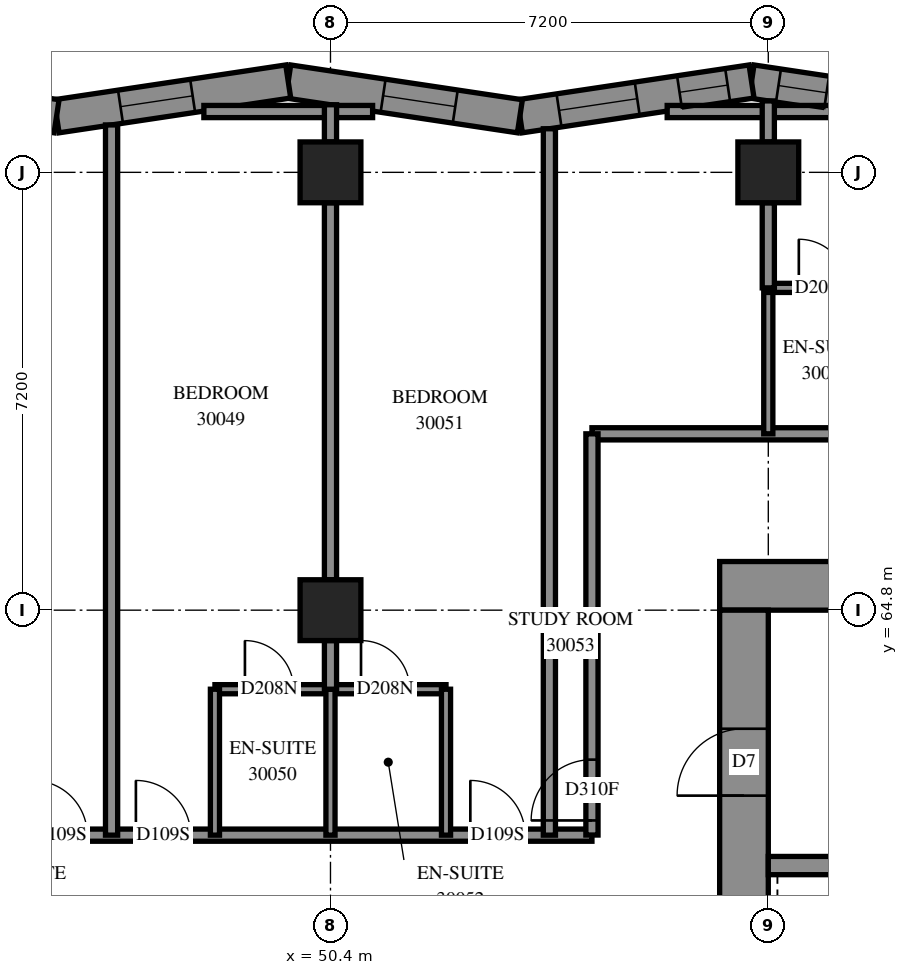
"""IFC4 building model, lengths in metres.
Left out: names, types, materials, properties, quantities, classifications, styles, units other than length and angle.
Written with IfcOpenShell. Run it as: python <this file> out.ifc"""

import sys

from ifc_helpers import new_model, si_unit, direction, frame, frame_2d, origin, origin_2d, place, context, subcontext, project, spatial, polyline, rectangle, outline, extrude, element, fill, save


model = new_model("IFC4")
c1 = context("Model", 3, precision=1e-05, world=origin(), true_north=direction((0.0, 1.0)))
c2 = subcontext(c1, "Body", "Model", "MODEL_VIEW")
j1 = project(units=[si_unit("LENGTHUNIT", "METRE"), si_unit("PLANEANGLEUNIT", "RADIAN")], contexts=[c1])
p1 = place(None, origin())
s1 = spatial("IfcSite", under=j1, at=p1, CompositionType="ELEMENT")
p2 = place(p1, origin())
s2 = spatial("IfcBuilding", under=s1, at=p2, CompositionType="ELEMENT")
p3 = place(p2, frame((0.0, 0.0, 111.8)))
s3 = spatial("IfcBuildingStorey", under=s2, at=p3, CompositionType="ELEMENT", Elevation=111.8)
for number, where, z_axis, x_axis in (
    (1, (50.4, 64.8, 0.0), (0.0, 0.0, 1.0), (1.0, 0.0, 0.0)),
    (2, (50.4, 72.0, 0.0), (0.0, 0.0, 1.0), (1.0, 0.0, 0.0)),
    (3, (57.6, 72.0, 0.0), (0.0, 0.0, 1.0), (1.0, 0.0, 0.0)),
):
    element("IfcColumn", number, at=place(p3, frame(where, z_axis=z_axis, x_axis=x_axis)), inside=s3, PredefinedType="COLUMN", context=c2, shape_type="SweptSolid", body=[
        extrude(rectangle(XDim=1.0, YDim=1.0, at=origin_2d()), origin(), (0.0, 0.0, 1.0), 3.1),
    ])
p4 = place(p3, frame((56.8, 65.2, -0.3), z_axis=(0.0, 0.0, 1.0), x_axis=(1.0, 0.0, 0.0)))
e4 = element("IfcWall", 4, at=p4, inside=s3, PredefinedType="SHEAR", context=c2, shape_type="SweptSolid", body=[
    extrude(rectangle(XDim=16.0, YDim=0.8, at=frame_2d((8.0, 0.0))), origin(), (0.0, 0.0, 1.0), 2.7),
])
p5 = place(p4, frame((10.8, 0.0, 0.3)))
e5 = element("IfcOpeningElement", 5, at=p5, cuts=e4, PredefinedType="OPENING", context=c2, shape_type="SweptSolid", body=[
    extrude(rectangle(XDim=0.8, YDim=2.1, at=frame_2d((0.4, 1.05))), frame((0.0, 0.41, 0.0), z_axis=(0.0, -1.0, 0.0), x_axis=(1.0, 0.0, 0.0)), (0.0, 0.0, 1.0), 0.82),
])
p6 = place(p3, frame((57.2, 50.4, -0.3), z_axis=(0.0, 0.0, 1.0), x_axis=(0.0, 1.0, 0.0)))
e6 = element("IfcWall", 6, at=p6, inside=s3, PredefinedType="SHEAR", context=c2, shape_type="SweptSolid", body=[
    extrude(rectangle(XDim=14.4, YDim=0.8, at=frame_2d((7.2, 0.0))), origin(), (0.0, 0.0, 1.0), 2.7),
])
p7 = place(p6, frame((4.55, 0.0, 0.3)))
e7 = element("IfcOpeningElement", 7, at=p7, cuts=e6, PredefinedType="OPENING", context=c2, shape_type="SweptSolid", body=[
    extrude(rectangle(XDim=1.1, YDim=2.1, at=frame_2d((0.55, 1.05))), frame((0.0, 0.41, 0.0), z_axis=(0.0, -1.0, 0.0), x_axis=(1.0, 0.0, 0.0)), (0.0, 0.0, 1.0), 0.82),
])
p8 = place(p6, frame((11.35, 0.0, 0.3)))
e8 = element("IfcOpeningElement", 8, at=p8, cuts=e6, PredefinedType="OPENING", context=c2, shape_type="SweptSolid", body=[
    extrude(rectangle(XDim=1.1, YDim=2.1, at=frame_2d((0.55, 1.05))), frame((0.0, 0.41, 0.0), z_axis=(0.0, -1.0, 0.0), x_axis=(1.0, 0.0, 0.0)), (0.0, 0.0, 1.0), 0.82),
])
p9 = place(p3, frame((57.6, 60.6, 0.0), z_axis=(0.0, 0.0, 1.0), x_axis=(1.0, 0.0, 0.0)))
e9 = element("IfcWall", 9, at=p9, inside=s3, PredefinedType="SOLIDWALL", context=c2, shape_type="SweptSolid", body=[
    extrude(rectangle(XDim=7.2, YDim=0.3, at=frame_2d((3.6, 0.0))), origin(), (0.0, 0.0, 1.0), 3.1),
])
p10 = place(p3, frame((61.134, 72.922, 0.0), z_axis=(0.0, 0.0, 1.0), x_axis=(-0.9889155896, 0.1484788086, 0.0)))
e10 = element("IfcWall", 10, at=p10, inside=s3, PredefinedType="SOLIDWALL", context=c2, shape_type="SweptSolid", body=[
    extrude(outline(polyline([(0.041, -0.275), (3.894, -0.275), (3.811, 0.275), (-0.041, 0.275), (0.041, -0.275)])), origin(), (0.0, 0.0, 1.0), 3.1),
])
p11 = place(p10, frame((0.505, 0.0, 0.5)))
e11 = element("IfcOpeningElement", 11, at=p11, cuts=e10, PredefinedType="OPENING", context=c2, shape_type="SweptSolid", body=[
    extrude(rectangle(XDim=1.3, YDim=2.45, at=frame_2d((0.65, 1.225))), frame((0.0, 0.285, 0.0), z_axis=(0.0, -1.0, 0.0), x_axis=(1.0, 0.0, 0.0)), (0.0, 0.0, 1.0), 0.57),
])
p12 = place(p10, frame((2.605, 0.0, 0.45)))
e12 = element("IfcOpeningElement", 12, at=p12, cuts=e10, PredefinedType="OPENING", context=c2, shape_type="SweptSolid", body=[
    extrude(rectangle(XDim=0.8, YDim=2.5, at=frame_2d((0.4, 1.25))), frame((0.0, 0.285, 0.0), z_axis=(0.0, -1.0, 0.0), x_axis=(1.0, 0.0, 0.0)), (0.0, 0.0, 1.0), 0.57),
])
p13 = place(p3, frame((57.325, 73.494, 0.0), z_axis=(0.0, 0.0, 1.0), x_axis=(-0.9889155896, -0.1484788086, 0.0)))
e13 = element("IfcWall", 13, at=p13, inside=s3, PredefinedType="SOLIDWALL", context=c2, shape_type="SweptSolid", body=[
    extrude(outline(polyline([(-0.041, -0.275), (3.811, -0.275), (3.894, 0.275), (0.041, 0.275), (-0.041, -0.275)])), origin(), (0.0, 0.0, 1.0), 3.1),
])
p14 = place(p13, frame((1.902, 0.0, 0.5)))
e14 = element("IfcOpeningElement", 14, at=p14, cuts=e13, PredefinedType="OPENING", context=c2, shape_type="SweptSolid", body=[
    extrude(rectangle(XDim=1.3, YDim=2.45, at=frame_2d((0.65, 1.225))), frame((0.0, 0.285, 0.0), z_axis=(0.0, -1.0, 0.0), x_axis=(1.0, 0.0, 0.0)), (0.0, 0.0, 1.0), 0.57),
])
p15 = place(p13, frame((0.398, 0.0, 0.45)))
e15 = element("IfcOpeningElement", 15, at=p15, cuts=e13, PredefinedType="OPENING", context=c2, shape_type="SweptSolid", body=[
    extrude(rectangle(XDim=0.8, YDim=2.5, at=frame_2d((0.4, 1.25))), frame((0.0, 0.285, 0.0), z_axis=(0.0, -1.0, 0.0), x_axis=(1.0, 0.0, 0.0)), (0.0, 0.0, 1.0), 0.57),
])
p16 = place(p3, frame((53.515, 72.922, 0.0), z_axis=(0.0, 0.0, 1.0), x_axis=(-0.9889150173, 0.1484826202, 0.0)))
e16 = element("IfcWall", 16, at=p16, inside=s3, PredefinedType="SOLIDWALL", context=c2, shape_type="SweptSolid", body=[
    extrude(outline(polyline([(0.041, -0.275), (3.894, -0.275), (3.811, 0.275), (-0.041, 0.275), (0.041, -0.275)])), origin(), (0.0, 0.0, 1.0), 3.1),
])
p17 = place(p16, frame((1.075, 0.0, 0.5)))
e17 = element("IfcOpeningElement", 17, at=p17, cuts=e16, PredefinedType="OPENING", context=c2, shape_type="SweptSolid", body=[
    extrude(rectangle(XDim=1.2, YDim=2.45, at=frame_2d((0.6, 1.225))), frame((0.0, 0.285, 0.0), z_axis=(0.0, -1.0, 0.0), x_axis=(1.0, 0.0, 0.0)), (0.0, 0.0, 1.0), 0.57),
])
p18 = place(p3, frame((49.705, 73.494, 0.0), z_axis=(0.0, 0.0, 1.0), x_axis=(-0.9889155896, -0.1484788086, 0.0)))
e18 = element("IfcWall", 18, at=p18, inside=s3, PredefinedType="SOLIDWALL", context=c2, shape_type="SweptSolid", body=[
    extrude(outline(polyline([(-0.041, -0.275), (3.811, -0.275), (3.894, 0.275), (0.041, 0.275), (-0.041, -0.275)])), origin(), (0.0, 0.0, 1.0), 3.1),
])
p19 = place(p18, frame((1.59, 0.0, 0.5)))
e19 = element("IfcOpeningElement", 19, at=p19, cuts=e18, PredefinedType="OPENING", context=c2, shape_type="SweptSolid", body=[
    extrude(rectangle(XDim=1.2, YDim=2.45, at=frame_2d((0.6, 1.225))), frame((0.0, 0.285, 0.0), z_axis=(0.0, -1.0, 0.0), x_axis=(1.0, 0.0, 0.0)), (0.0, 0.0, 1.0), 0.57),
])
p20 = place(p3, frame((45.896, 72.922, 0.0), z_axis=(0.0, 0.0, 1.0), x_axis=(-0.9889150173, 0.1484826202, 0.0)))
e20 = element("IfcWall", 20, at=p20, inside=s3, PredefinedType="SOLIDWALL", context=c2, shape_type="SweptSolid", body=[
    extrude(outline(polyline([(0.041, -0.275), (3.894, -0.275), (3.811, 0.275), (-0.041, 0.275), (0.041, -0.275)])), origin(), (0.0, 0.0, 1.0), 3.1),
])
p21 = place(p20, frame((0.863, 0.0, 0.5)))
e21 = element("IfcOpeningElement", 21, at=p21, cuts=e20, PredefinedType="OPENING", context=c2, shape_type="SweptSolid", body=[
    extrude(rectangle(XDim=1.2, YDim=2.45, at=frame_2d((0.6, 1.225))), frame((0.0, 0.285, 0.0), z_axis=(0.0, -1.0, 0.0), x_axis=(1.0, 0.0, 0.0)), (0.0, 0.0, 1.0), 0.57),
])
p22 = place(p3, frame((33.502, 61.1, 0.0), z_axis=(0.0, 0.0, 1.0), x_axis=(1.0, 0.0, 0.0)))
e22 = element("IfcWall", 22, at=p22, inside=s3, PredefinedType="PARTITIONING", context=c2, shape_type="SweptSolid", body=[
    extrude(rectangle(XDim=21.198, YDim=0.2, at=frame_2d((10.599, 0.0))), origin(), (0.0, 0.0, 1.0), 3.1),
])
p23 = place(p22, frame((4.798, 0.0, 0.0)))
e23 = element("IfcOpeningElement", 23, at=p23, cuts=e22, PredefinedType="OPENING", context=c2, shape_type="SweptSolid", body=[
    extrude(rectangle(XDim=0.9, YDim=2.1, at=frame_2d((0.45, 1.05))), frame((0.0, 0.11, 0.0), z_axis=(0.0, -1.0, 0.0), x_axis=(1.0, 0.0, 0.0)), (0.0, 0.0, 1.0), 0.22),
])
p24 = place(p22, frame((6.498, 0.0, 0.0)))
e24 = element("IfcOpeningElement", 24, at=p24, cuts=e22, PredefinedType="OPENING", context=c2, shape_type="SweptSolid", body=[
    extrude(rectangle(XDim=0.9, YDim=2.1, at=frame_2d((0.45, 1.05))), frame((0.0, 0.11, 0.0), z_axis=(0.0, -1.0, 0.0), x_axis=(1.0, 0.0, 0.0)), (0.0, 0.0, 1.0), 0.22),
])
p25 = place(p22, frame((11.998, 0.0, 0.0)))
e25 = element("IfcOpeningElement", 25, at=p25, cuts=e22, PredefinedType="OPENING", context=c2, shape_type="SweptSolid", body=[
    extrude(rectangle(XDim=0.9, YDim=2.1, at=frame_2d((0.45, 1.05))), frame((0.0, 0.11, 0.0), z_axis=(0.0, -1.0, 0.0), x_axis=(1.0, 0.0, 0.0)), (0.0, 0.0, 1.0), 0.22),
])
p26 = place(p22, frame((13.698, 0.0, 0.0)))
e26 = element("IfcOpeningElement", 26, at=p26, cuts=e22, PredefinedType="OPENING", context=c2, shape_type="SweptSolid", body=[
    extrude(rectangle(XDim=0.9, YDim=2.1, at=frame_2d((0.45, 1.05))), frame((0.0, 0.11, 0.0), z_axis=(0.0, -1.0, 0.0), x_axis=(1.0, 0.0, 0.0)), (0.0, 0.0, 1.0), 0.22),
])
p27 = place(p22, frame((19.198, 0.0, 0.0)))
e27 = element("IfcOpeningElement", 27, at=p27, cuts=e22, PredefinedType="OPENING", context=c2, shape_type="SweptSolid", body=[
    extrude(rectangle(XDim=0.9, YDim=2.1, at=frame_2d((0.45, 1.05))), frame((0.0, 0.11, 0.0), z_axis=(0.0, -1.0, 0.0), x_axis=(1.0, 0.0, 0.0)), (0.0, 0.0, 1.0), 0.22),
])
p28 = place(p3, frame((54.7, 67.7, 0.0), z_axis=(0.0, 0.0, 1.0), x_axis=(1.0, 0.0, 0.0)))
e28 = element("IfcWall", 28, at=p28, inside=s3, PredefinedType="PARTITIONING", context=c2, shape_type="SweptSolid", body=[
    extrude(rectangle(XDim=20.2, YDim=0.2, at=frame_2d((10.1, 0.0))), origin(), (0.0, 0.0, 1.0), 3.1),
])
p29 = place(p28, frame((5.2, 0.0, 0.0)))
e29 = element("IfcOpeningElement", 29, at=p29, cuts=e28, PredefinedType="OPENING", context=c2, shape_type="SweptSolid", body=[
    extrude(rectangle(XDim=0.9, YDim=2.1, at=frame_2d((0.45, 1.05))), frame((0.0, 0.11, 0.0), z_axis=(0.0, -1.0, 0.0), x_axis=(1.0, 0.0, 0.0)), (0.0, 0.0, 1.0), 0.22),
])
p30 = place(p28, frame((8.838, 0.0, 0.0)))
e30 = element("IfcOpeningElement", 30, at=p30, cuts=e28, PredefinedType="OPENING", context=c2, shape_type="SweptSolid", body=[
    extrude(rectangle(XDim=1.0, YDim=2.1, at=frame_2d((0.5, 1.05))), frame((0.0, 0.11, 0.0), z_axis=(0.0, -1.0, 0.0), x_axis=(1.0, 0.0, 0.0)), (0.0, 0.0, 1.0), 0.22),
])
p31 = place(p28, frame((14.1, 0.0, 0.0)))
e31 = element("IfcOpeningElement", 31, at=p31, cuts=e28, PredefinedType="OPENING", context=c2, shape_type="SweptSolid", body=[
    extrude(rectangle(XDim=0.9, YDim=2.1, at=frame_2d((0.45, 1.05))), frame((0.0, 0.11, 0.0), z_axis=(0.0, -1.0, 0.0), x_axis=(1.0, 0.0, 0.0)), (0.0, 0.0, 1.0), 0.22),
])
p32 = place(p3, frame((46.8, 61.1, 0.0), z_axis=(0.0, 0.0, 1.0), x_axis=(0.0, 1.0, 0.0)))
e32 = element("IfcWall", 32, at=p32, inside=s3, PredefinedType="PARTITIONING", context=c2, shape_type="SweptSolid", body=[
    extrude(rectangle(XDim=11.68, YDim=0.2, at=frame_2d((5.84, 0.0))), origin(), (0.0, 0.0, 1.0), 3.1),
])
p33 = place(p3, frame((54.0, 61.1, 0.0), z_axis=(0.0, 0.0, 1.0), x_axis=(0.0, 1.0, 0.0)))
e33 = element("IfcWall", 33, at=p33, inside=s3, PredefinedType="PARTITIONING", context=c2, shape_type="SweptSolid", body=[
    extrude(rectangle(XDim=11.617, YDim=0.2, at=frame_2d((5.808, 0.0))), origin(), (0.0, 0.0, 1.0), 3.1),
])
p34 = place(p3, frame((54.7, 61.102, 0.0), z_axis=(0.0, 0.0, 1.0), x_axis=(0.0, 1.0, 0.0)))
e34 = element("IfcWall", 34, at=p34, inside=s3, PredefinedType="PARTITIONING", context=c2, shape_type="SweptSolid", body=[
    extrude(rectangle(XDim=6.598, YDim=0.2, at=frame_2d((3.299, 0.0))), origin(), (0.0, 0.0, 1.0), 3.1),
])
p35 = place(p34, frame((0.24, 0.0, 0.0)))
e35 = element("IfcOpeningElement", 35, at=p35, cuts=e34, PredefinedType="OPENING", context=c2, shape_type="SweptSolid", body=[
    extrude(rectangle(XDim=1.0, YDim=2.1, at=frame_2d((0.5, 1.05))), frame((0.0, 0.11, 0.0), z_axis=(0.0, -1.0, 0.0), x_axis=(1.0, 0.0, 0.0)), (0.0, 0.0, 1.0), 0.22),
])
p36 = place(p3, frame((50.4, 65.3, 0.0), z_axis=(0.0, 0.0, 1.0), x_axis=(0.0, 1.0, 0.0)))
e36 = element("IfcWall", 36, at=p36, inside=s3, PredefinedType="PARTITIONING", context=c2, shape_type="SweptSolid", body=[
    extrude(rectangle(XDim=6.2, YDim=0.2, at=frame_2d((3.1, 0.0))), origin(), (0.0, 0.0, 1.0), 3.1),
])
p37 = place(p3, frame((48.5, 63.5, 0.0), z_axis=(0.0, 0.0, 1.0), x_axis=(1.0, 0.0, 0.0)))
e37 = element("IfcWall", 37, at=p37, inside=s3, PredefinedType="PARTITIONING", context=c2, shape_type="SweptSolid", body=[
    extrude(rectangle(XDim=3.8, YDim=0.15, at=frame_2d((1.9, 0.0))), origin(), (0.0, 0.0, 1.0), 3.1),
])
p38 = place(p37, frame((0.493, 0.0, 0.0)))
e38 = element("IfcOpeningElement", 38, at=p38, cuts=e37, PredefinedType="OPENING", context=c2, shape_type="SweptSolid", body=[
    extrude(rectangle(XDim=0.8, YDim=2.1, at=frame_2d((0.4, 1.05))), frame((0.0, 0.085, 0.0), z_axis=(0.0, -1.0, 0.0), x_axis=(1.0, 0.0, 0.0)), (0.0, 0.0, 1.0), 0.17),
])
p39 = place(p37, frame((2.402, 0.0, 0.0)))
e39 = element("IfcOpeningElement", 39, at=p39, cuts=e37, PredefinedType="OPENING", context=c2, shape_type="SweptSolid", body=[
    extrude(rectangle(XDim=0.8, YDim=2.1, at=frame_2d((0.4, 1.05))), frame((0.0, 0.085, 0.0), z_axis=(0.0, -1.0, 0.0), x_axis=(1.0, 0.0, 0.0)), (0.0, 0.0, 1.0), 0.17),
])
for number, where, z_axis, x_axis in (
    (40, (55.937, 73.0, 0.0), (0.0, 0.0, 1.0), (1.0, 0.0, 0.0)),
    (41, (48.318, 73.0, 0.0), (0.0, 0.0, 1.0), (1.0, 0.0, 0.0)),
):
    element("IfcWall", number, at=place(p3, frame(where, z_axis=z_axis, x_axis=x_axis)), inside=s3, PredefinedType="PARTITIONING", context=c2, shape_type="SweptSolid", body=[
        extrude(rectangle(XDim=2.775, YDim=0.2, at=frame_2d((1.387, 0.0))), origin(), (0.0, 0.0, 1.0), 3.1),
    ])
for number, where, z_axis, x_axis in (
    (42, (48.5, 61.1, 0.0), (0.0, 0.0, 1.0), (0.0, 1.0, 0.0)),
    (43, (50.4, 61.1, 0.0), (0.0, 0.0, 1.0), (0.0, 1.0, 0.0)),
    (44, (52.3, 61.1, 0.0), (0.0, 0.0, 1.0), (0.0, 1.0, 0.0)),
    (45, (57.6, 67.7, 0.0), (0.0, 0.0, 1.0), (0.0, 1.0, 0.0)),
):
    element("IfcWall", number, at=place(p3, frame(where, z_axis=z_axis, x_axis=x_axis)), inside=s3, PredefinedType="PARTITIONING", context=c2, shape_type="SweptSolid", body=[
        extrude(rectangle(XDim=2.4, YDim=0.15, at=frame_2d((1.2, 0.0))), origin(), (0.0, 0.0, 1.0), 3.1),
    ])
p40 = place(p3, frame((57.6, 70.1, 0.0), z_axis=(0.0, 0.0, 1.0), x_axis=(1.0, 0.0, 0.0)))
e46 = element("IfcWall", 46, at=p40, inside=s3, PredefinedType="PARTITIONING", context=c2, shape_type="SweptSolid", body=[
    extrude(rectangle(XDim=1.9, YDim=0.15, at=frame_2d((0.95, 0.0))), origin(), (0.0, 0.0, 1.0), 3.1),
])
p41 = place(p40, frame((0.502, 0.0, 0.0)))
e47 = element("IfcOpeningElement", 47, at=p41, cuts=e46, PredefinedType="OPENING", context=c2, shape_type="SweptSolid", body=[
    extrude(rectangle(XDim=0.8, YDim=2.1, at=frame_2d((0.4, 1.05))), frame((0.0, 0.085, 0.0), z_axis=(0.0, -1.0, 0.0), x_axis=(1.0, 0.0, 0.0)), (0.0, 0.0, 1.0), 0.17),
])
p42 = place(p3, frame((57.6, 70.1, 0.0), z_axis=(0.0, 0.0, 1.0), x_axis=(0.0, 1.0, 0.0)))
e48 = element("IfcWall", 48, at=p42, inside=s3, PredefinedType="PARTITIONING", context=c2, shape_type="SweptSolid", body=[
    extrude(rectangle(XDim=1.4, YDim=0.2, at=frame_2d((0.7, 0.0))), origin(), (0.0, 0.0, 1.0), 3.1),
])
p43 = place(p3, frame((50.4, 63.5, 0.0), z_axis=(0.0, 0.0, 1.0), x_axis=(0.0, 1.0, 0.0)))
e49 = element("IfcWall", 49, at=p43, inside=s3, PredefinedType="PARTITIONING", context=c2, shape_type="SweptSolid", body=[
    extrude(rectangle(XDim=0.8, YDim=0.2, at=frame_2d((0.4, 0.0))), origin(), (0.0, 0.0, 1.0), 3.1),
])
p44 = place(p3, frame((50.4, 72.5, 0.0), z_axis=(0.0, 0.0, 1.0), x_axis=(0.0, 1.0, 0.0)))
e50 = element("IfcWall", 50, at=p44, inside=s3, PredefinedType="PARTITIONING", context=c2, shape_type="SweptSolid", body=[
    extrude(rectangle(XDim=0.612, YDim=0.2, at=frame_2d((0.306, 0.0))), origin(), (0.0, 0.0, 1.0), 3.1),
])
p45 = place(p3, frame((57.6, 72.5, 0.0), z_axis=(0.0, 0.0, 1.0), x_axis=(0.0, 1.0, 0.0)))
e51 = element("IfcWall", 51, at=p45, inside=s3, PredefinedType="PARTITIONING", context=c2, shape_type="SweptSolid", body=[
    extrude(rectangle(XDim=0.674, YDim=0.2, at=frame_2d((0.337, 0.0))), origin(), (0.0, 0.0, 1.0), 3.1),
])
p46 = place(p14, origin())
e52 = element("IfcWindow", 52, at=p46, inside=s3, PartitioningType="SINGLE_PANEL", PredefinedType="WINDOW", context=c2, shape_type="SweptSolid", body=[
    extrude(rectangle(XDim=1.3, YDim=2.45, at=frame_2d((0.65, 1.225))), frame((0.0, 0.155, 0.0), z_axis=(0.0, -1.0, 0.0), x_axis=(1.0, 0.0, 0.0)), (0.0, 0.0, 1.0), 0.06),
])
fill(e14, e52)
p47 = place(p17, origin())
e53 = element("IfcWindow", 53, at=p47, inside=s3, PartitioningType="SINGLE_PANEL", PredefinedType="WINDOW", context=c2, shape_type="SweptSolid", body=[
    extrude(rectangle(XDim=1.2, YDim=2.45, at=frame_2d((0.6, 1.225))), frame((0.0, 0.155, 0.0), z_axis=(0.0, -1.0, 0.0), x_axis=(1.0, 0.0, 0.0)), (0.0, 0.0, 1.0), 0.06),
])
fill(e17, e53)
p48 = place(p19, origin())
e54 = element("IfcWindow", 54, at=p48, inside=s3, PartitioningType="SINGLE_PANEL", PredefinedType="WINDOW", context=c2, shape_type="SweptSolid", body=[
    extrude(rectangle(XDim=1.2, YDim=2.45, at=frame_2d((0.6, 1.225))), frame((0.0, 0.155, 0.0), z_axis=(0.0, -1.0, 0.0), x_axis=(1.0, 0.0, 0.0)), (0.0, 0.0, 1.0), 0.06),
])
fill(e19, e54)
p49 = place(p8, origin())
e55 = element("IfcDoor", 55, at=p49, inside=s3, OperationType="SINGLE_SWING_LEFT", PredefinedType="DOOR", context=c2, shape_type="SweptSolid", body=[
    extrude(rectangle(XDim=1.1, YDim=2.1, at=frame_2d((0.55, 1.05))), frame((0.0, 0.025, 0.0), z_axis=(0.0, -1.0, 0.0), x_axis=(1.0, 0.0, 0.0)), (0.0, 0.0, 1.0), 0.05),
])
fill(e8, e55)
p50 = place(p25, origin())
e56 = element("IfcDoor", 56, at=p50, inside=s3, OperationType="SINGLE_SWING_RIGHT", PredefinedType="DOOR", context=c2, shape_type="SweptSolid", body=[
    extrude(rectangle(XDim=0.9, YDim=2.1, at=frame_2d((0.45, 1.05))), frame((0.0, 0.025, 0.0), z_axis=(0.0, -1.0, 0.0), x_axis=(1.0, 0.0, 0.0)), (0.0, 0.0, 1.0), 0.05),
])
fill(e25, e56)
p51 = place(p26, origin())
e57 = element("IfcDoor", 57, at=p51, inside=s3, OperationType="SINGLE_SWING_LEFT", PredefinedType="DOOR", context=c2, shape_type="SweptSolid", body=[
    extrude(rectangle(XDim=0.9, YDim=2.1, at=frame_2d((0.45, 1.05))), frame((0.0, 0.025, 0.0), z_axis=(0.0, -1.0, 0.0), x_axis=(1.0, 0.0, 0.0)), (0.0, 0.0, 1.0), 0.05),
])
fill(e26, e57)
p52 = place(p38, origin())
e58 = element("IfcDoor", 58, at=p52, inside=s3, OperationType="SINGLE_SWING_RIGHT", PredefinedType="DOOR", context=c2, shape_type="SweptSolid", body=[
    extrude(rectangle(XDim=0.8, YDim=2.1, at=frame_2d((0.4, 1.05))), frame((0.0, 0.025, 0.0), z_axis=(0.0, -1.0, 0.0), x_axis=(1.0, 0.0, 0.0)), (0.0, 0.0, 1.0), 0.05),
])
fill(e38, e58)
p53 = place(p27, origin())
e59 = element("IfcDoor", 59, at=p53, inside=s3, OperationType="SINGLE_SWING_RIGHT", PredefinedType="DOOR", context=c2, shape_type="SweptSolid", body=[
    extrude(rectangle(XDim=0.9, YDim=2.1, at=frame_2d((0.45, 1.05))), frame((0.0, 0.025, 0.0), z_axis=(0.0, -1.0, 0.0), x_axis=(1.0, 0.0, 0.0)), (0.0, 0.0, 1.0), 0.05),
])
fill(e27, e59)
p54 = place(p39, origin())
e60 = element("IfcDoor", 60, at=p54, inside=s3, OperationType="SINGLE_SWING_RIGHT", PredefinedType="DOOR", context=c2, shape_type="SweptSolid", body=[
    extrude(rectangle(XDim=0.8, YDim=2.1, at=frame_2d((0.4, 1.05))), frame((0.0, 0.025, 0.0), z_axis=(0.0, -1.0, 0.0), x_axis=(1.0, 0.0, 0.0)), (0.0, 0.0, 1.0), 0.05),
])
fill(e39, e60)
p55 = place(p35, origin())
e61 = element("IfcDoor", 61, at=p55, inside=s3, OperationType="SINGLE_SWING_LEFT", PredefinedType="DOOR", context=c2, shape_type="SweptSolid", body=[
    extrude(rectangle(XDim=1.0, YDim=2.1, at=frame_2d((0.5, 1.05))), frame((0.0, 0.025, 0.0), z_axis=(0.0, -1.0, 0.0), x_axis=(1.0, 0.0, 0.0)), (0.0, 0.0, 1.0), 0.05),
])
fill(e35, e61)
p56 = place(p41, origin())
e62 = element("IfcDoor", 62, at=p56, inside=s3, OperationType="SINGLE_SWING_RIGHT", PredefinedType="DOOR", context=c2, shape_type="SweptSolid", body=[
    extrude(rectangle(XDim=0.8, YDim=2.1, at=frame_2d((0.4, 1.05))), frame((0.0, 0.025, 0.0), z_axis=(0.0, -1.0, 0.0), x_axis=(1.0, 0.0, 0.0)), (0.0, 0.0, 1.0), 0.05),
])
fill(e47, e62)
p57 = place(p12, origin())
e63 = element("IfcWindow", 63, at=p57, inside=s3, PartitioningType="SINGLE_PANEL", PredefinedType="WINDOW", context=c2, shape_type="SweptSolid", body=[
    extrude(rectangle(XDim=0.8, YDim=2.5, at=frame_2d((0.4, 1.25))), frame((0.0, 0.155, 0.0), z_axis=(0.0, -1.0, 0.0), x_axis=(1.0, 0.0, 0.0)), (0.0, 0.0, 1.0), 0.06),
])
fill(e12, e63)
p58 = place(p15, origin())
e64 = element("IfcWindow", 64, at=p58, inside=s3, PartitioningType="SINGLE_PANEL", PredefinedType="WINDOW", context=c2, shape_type="SweptSolid", body=[
    extrude(rectangle(XDim=0.8, YDim=2.5, at=frame_2d((0.4, 1.25))), frame((0.0, 0.155, 0.0), z_axis=(0.0, -1.0, 0.0), x_axis=(1.0, 0.0, 0.0)), (0.0, 0.0, 1.0), 0.06),
])
fill(e15, e64)
save(model, sys.argv[1])
